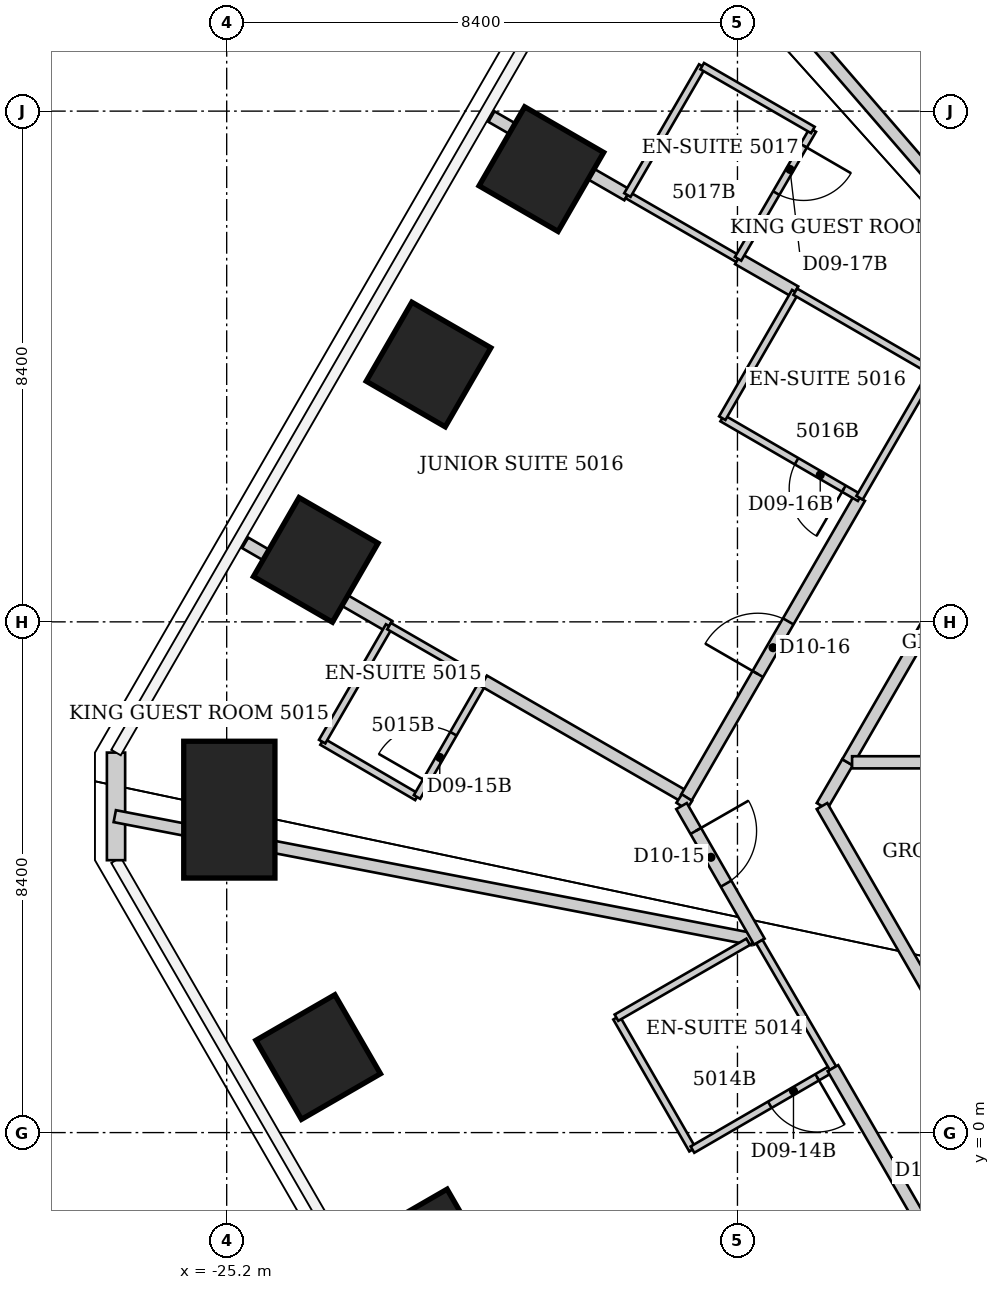
"""IFC4 building model, lengths in metres.
Left out: names, types, materials, properties, quantities, classifications, styles, units other than length and angle.
Written with IfcOpenShell. Run it as: python <this file> out.ifc"""

import sys

from ifc_helpers import new_model, si_unit, direction, frame, frame_2d, origin, origin_2d, place, context, subcontext, project, spatial, rectangle, extrude, element, fill, save


model = new_model("IFC4")
c1 = context("Model", 3, precision=1e-05, world=origin(), true_north=direction((0.0, 1.0)))
c2 = subcontext(c1, "Body", "Model", "MODEL_VIEW")
j1 = project(units=[si_unit("LENGTHUNIT", "METRE"), si_unit("PLANEANGLEUNIT", "RADIAN")], contexts=[c1])
p1 = place(None, origin())
s1 = spatial("IfcSite", under=j1, at=p1, CompositionType="ELEMENT")
p2 = place(p1, origin())
s2 = spatial("IfcBuilding", under=s1, at=p2, CompositionType="ELEMENT")
p3 = place(p2, frame((0.0, 0.0, 202.2)))
s3 = spatial("IfcBuildingStorey", under=s2, at=p3, CompositionType="ELEMENT", Elevation=202.2)
for number, where, z_axis, x_axis in (
    (1, (-21.85, -1.956, 0.0), (0.0, 0.0, 1.0), (-0.866, -0.5, 0.0)),
    (2, (-23.696, 1.242, 0.0), (0.0, 0.0, 1.0), (-0.866, -0.5, 0.0)),
):
    element("IfcColumn", number, at=place(p3, frame(where, z_axis=z_axis, x_axis=x_axis)), inside=s3, PredefinedType="COLUMN", context=c2, shape_type="SweptSolid", body=[
        extrude(rectangle(XDim=1.5, YDim=1.5, at=origin_2d()), origin(), (0.0, 0.0, 1.0), 3.8),
    ])
p4 = place(p3, frame((-25.156, 5.311, 0.0), z_axis=(0.0, 0.0, 1.0), x_axis=(-1.0, 0.0, 0.0)))
e3 = element("IfcColumn", 3, at=p4, inside=s3, PredefinedType="COLUMN", context=c2, shape_type="SweptSolid", body=[
    extrude(rectangle(XDim=1.5, YDim=2.25, at=origin_2d()), origin(), (0.0, 0.0, 1.0), 3.8),
])
for number, where, z_axis, x_axis in (
    (4, (-23.735, 9.419, 0.0), (0.0, 0.0, 1.0), (-0.866, 0.5, 0.0)),
    (5, (-21.88, 12.633, 0.0), (0.0, 0.0, 1.0), (-0.866, 0.5, 0.0)),
    (6, (-20.025, 15.846, 0.0), (0.0, 0.0, 1.0), (-0.866, 0.5, 0.0)),
):
    element("IfcColumn", number, at=place(p3, frame(where, z_axis=z_axis, x_axis=x_axis)), inside=s3, PredefinedType="COLUMN", context=c2, shape_type="SweptSolid", body=[
        extrude(rectangle(XDim=1.5, YDim=1.5, at=origin_2d()), origin(), (0.0, 0.0, 1.0), 3.8),
    ])
p5 = place(p3, frame((-27.02, 4.48, 0.0), z_axis=(0.0, 0.0, 1.0), x_axis=(0.0, 1.0, 0.0)))
e7 = element("IfcWall", 7, at=p5, inside=s3, PredefinedType="SOLIDWALL", context=c2, shape_type="SweptSolid", body=[
    extrude(rectangle(XDim=1.77, YDim=0.3, at=frame_2d((0.885, 0.0))), origin(), (0.0, 0.0, 1.0), 3.64),
])
p6 = place(p3, frame((-27.041, 5.204, 0.0), z_axis=(0.0, 0.0, 1.0), x_axis=(0.981884490433, -0.18948046719, 0.0)))
e8 = element("IfcWall", 8, at=p6, inside=s3, PredefinedType="PARTITIONING", context=c2, shape_type="SweptSolid", body=[
    extrude(rectangle(XDim=10.684, YDim=0.2, at=frame_2d((5.342, 0.0))), origin(), (0.0, 0.0, 1.0), 3.64),
])
p7 = place(p3, frame((-24.896, 9.7, 0.0), z_axis=(0.0, 0.0, 1.0), x_axis=(0.865432398871, -0.501025710902, 0.0)))
e9 = element("IfcWall", 9, at=p7, inside=s3, PredefinedType="PARTITIONING", context=c2, shape_type="SweptSolid", body=[
    extrude(rectangle(XDim=2.734, YDim=0.2, at=frame_2d((1.367, 0.0))), origin(), (0.0, 0.0, 1.0), 3.64),
])
p8 = place(p3, frame((-23.63, 6.43, 0.0), z_axis=(0.0, 0.0, 1.0), x_axis=(0.863773997337, -0.503879431535, 0.0)))
e10 = element("IfcWall", 10, at=p8, inside=s3, PredefinedType="PARTITIONING", context=c2, shape_type="SweptSolid", body=[
    extrude(rectangle(XDim=1.806, YDim=0.12, at=frame_2d((0.903, 0.0))), origin(), (0.0, 0.0, 1.0), 3.64),
])
p9 = place(p3, frame((-22.53, 8.33, 0.0), z_axis=(0.0, 0.0, 1.0), x_axis=(-0.500957366999, -0.865471961677, 0.0)))
e11 = element("IfcWall", 11, at=p9, inside=s3, PredefinedType="PARTITIONING", context=c2, shape_type="SweptSolid", body=[
    extrude(rectangle(XDim=2.196, YDim=0.12, at=frame_2d((1.098, 0.0))), origin(), (0.0, 0.0, 1.0), 3.64),
])
p10 = place(p3, frame((-22.53, 8.33, 0.0), z_axis=(0.0, 0.0, 1.0), x_axis=(0.866158505053, -0.499769390944, 0.0)))
e12 = element("IfcWall", 12, at=p10, inside=s3, PredefinedType="PARTITIONING", context=c2, shape_type="SweptSolid", body=[
    extrude(rectangle(XDim=1.801, YDim=0.12, at=frame_2d((0.9, 0.0))), origin(), (0.0, 0.0, 1.0), 3.64),
])
p11 = place(p3, frame((-22.07, 5.52, 0.0), z_axis=(0.0, 0.0, 1.0), x_axis=(0.499118212815, 0.866533905648, 0.0)))
e13 = element("IfcWall", 13, at=p11, inside=s3, PredefinedType="PARTITIONING", context=c2, shape_type="SweptSolid", body=[
    extrude(rectangle(XDim=2.204, YDim=0.12, at=frame_2d((1.102, 0.0))), origin(), (0.0, 0.0, 1.0), 3.64),
])
p12 = place(p11, frame((0.3, 0.0, 0.0)))
e14 = element("IfcOpeningElement", 14, at=p12, cuts=e13, PredefinedType="OPENING", context=c2, shape_type="SweptSolid", body=[
    extrude(rectangle(XDim=0.9, YDim=2.03, at=frame_2d((0.45, 1.015))), frame((0.0, 0.06, 0.0), z_axis=(0.0, -1.0, 0.0), x_axis=(1.0, 0.0, 0.0)), (0.0, 0.0, 1.0), 0.12),
])
p13 = place(p3, frame((-20.97, 7.43, 0.0), z_axis=(0.0, 0.0, 1.0), x_axis=(0.866325681624, -0.499479542482, 0.0)))
e15 = element("IfcWall", 15, at=p13, inside=s3, PredefinedType="PARTITIONING", context=c2, shape_type="SweptSolid", body=[
    extrude(rectangle(XDim=3.829, YDim=0.2, at=frame_2d((1.914, 0.0))), origin(), (0.0, 0.0, 1.0), 3.64),
])
p14 = place(p3, frame((-20.846, 16.71, 0.0), z_axis=(0.0, 0.0, 1.0), x_axis=(0.866163541035, -0.499760662899, 0.0)))
e16 = element("IfcWall", 16, at=p14, inside=s3, PredefinedType="PARTITIONING", context=c2, shape_type="SweptSolid", body=[
    extrude(rectangle(XDim=2.581, YDim=0.2, at=frame_2d((1.291, 0.0))), origin(), (0.0, 0.0, 1.0), 3.64),
])
p15 = place(p3, frame((-18.79, 1.89, 0.0), z_axis=(0.0, 0.0, 1.0), x_axis=(0.499159685399, -0.866510016372, 0.0)))
e17 = element("IfcWall", 17, at=p15, inside=s3, PredefinedType="PARTITIONING", context=c2, shape_type="SweptSolid", body=[
    extrude(rectangle(XDim=2.504, YDim=0.12, at=frame_2d((1.252, 0.0))), origin(), (0.0, 0.0, 1.0), 3.64),
])
p16 = place(p3, frame((-18.61, 15.42, 0.0), z_axis=(0.0, 0.0, 1.0), x_axis=(0.86618365172, -0.499725806311, 0.0)))
e18 = element("IfcWall", 18, at=p16, inside=s3, PredefinedType="PARTITIONING", context=c2, shape_type="SweptSolid", body=[
    extrude(rectangle(XDim=2.101, YDim=0.12, at=frame_2d((1.051, 0.0))), origin(), (0.0, 0.0, 1.0), 3.64),
])
p17 = place(p3, frame((-18.02, 20.817, 0.0), z_axis=(0.0, 0.0, 1.0), x_axis=(0.654118793629, -0.756391832201, 0.0)))
e19 = element("IfcWall", 19, at=p17, inside=s3, PredefinedType="PARTITIONING", context=c2, shape_type="SweptSolid", body=[
    extrude(rectangle(XDim=8.088, YDim=0.2, at=frame_2d((4.044, 0.0))), origin(), (0.0, 0.0, 1.0), 3.64),
])
p18 = place(p3, frame((-17.64, 5.51, 0.0), z_axis=(0.0, 0.0, 1.0), x_axis=(0.500468304441, 0.865754859212, 0.0)))
e20 = element("IfcWall", 20, at=p18, inside=s3, PredefinedType="PARTITIONING", context=c2, shape_type="SweptSolid", body=[
    extrude(rectangle(XDim=5.694, YDim=0.2, at=frame_2d((2.847, 0.0))), origin(), (0.0, 0.0, 1.0), 3.64),
])
p19 = place(p18, frame((2.347, 0.0, 0.0)))
e21 = element("IfcOpeningElement", 21, at=p19, cuts=e20, PredefinedType="OPENING", context=c2, shape_type="SweptSolid", body=[
    extrude(rectangle(XDim=1.0, YDim=2.13, at=frame_2d((0.5, 1.065))), frame((0.0, 0.1, 0.0), z_axis=(0.0, -1.0, 0.0), x_axis=(1.0, 0.0, 0.0)), (0.0, 0.0, 1.0), 0.2),
])
p20 = place(p3, frame((-17.63, 5.51, 0.0), z_axis=(0.0, 0.0, 1.0), x_axis=(-0.541424846284, -0.840749151547, 0.0)))
e22 = element("IfcWall", 22, at=p20, inside=s3, PredefinedType="PARTITIONING", context=c2, shape_type="SweptSolid", body=[
    extrude(rectangle(XDim=0.167, YDim=0.2, at=frame_2d((0.083, 0.0))), origin(), (0.0, 0.0, 1.0), 3.64),
])
p21 = place(p3, frame((-17.54, -0.28, 0.0), z_axis=(0.0, 0.0, 1.0), x_axis=(0.86498992408, 0.501789229896, 0.0)))
e23 = element("IfcWall", 23, at=p21, inside=s3, PredefinedType="PARTITIONING", context=c2, shape_type="SweptSolid", body=[
    extrude(rectangle(XDim=2.671, YDim=0.12, at=frame_2d((1.335, 0.0))), origin(), (0.0, 0.0, 1.0), 3.64),
])
p22 = place(p21, frame((1.47, 0.0, 0.0)))
e24 = element("IfcOpeningElement", 24, at=p22, cuts=e23, PredefinedType="OPENING", context=c2, shape_type="SweptSolid", body=[
    extrude(rectangle(XDim=0.9, YDim=2.03, at=frame_2d((0.45, 1.015))), frame((0.0, 0.06, 0.0), z_axis=(0.0, -1.0, 0.0), x_axis=(1.0, 0.0, 0.0)), (0.0, 0.0, 1.0), 0.12),
])
p23 = place(p3, frame((-17.38, 17.54, 0.0), z_axis=(0.0, 0.0, 1.0), x_axis=(-0.501888006485, -0.864932615264, 0.0)))
e25 = element("IfcWall", 25, at=p23, inside=s3, PredefinedType="PARTITIONING", context=c2, shape_type="SweptSolid", body=[
    extrude(rectangle(XDim=2.451, YDim=0.12, at=frame_2d((1.226, 0.0))), origin(), (0.0, 0.0, 1.0), 3.64),
])
p24 = place(p3, frame((-17.05, 11.75, 0.0), z_axis=(0.0, 0.0, 1.0), x_axis=(0.865155281359, -0.50150407689, 0.0)))
e26 = element("IfcWall", 26, at=p24, inside=s3, PredefinedType="PARTITIONING", context=c2, shape_type="SweptSolid", body=[
    extrude(rectangle(XDim=2.612, YDim=0.12, at=frame_2d((1.306, 0.0))), origin(), (0.0, 0.0, 1.0), 3.64),
])
p25 = place(p24, frame((1.412, 0.0, 0.0)))
e27 = element("IfcOpeningElement", 27, at=p25, cuts=e26, PredefinedType="OPENING", context=c2, shape_type="SweptSolid", body=[
    extrude(rectangle(XDim=0.9, YDim=2.03, at=frame_2d((0.45, 1.015))), frame((0.0, 0.06, 0.0), z_axis=(0.0, -1.0, 0.0), x_axis=(1.0, 0.0, 0.0)), (0.0, 0.0, 1.0), 0.12),
])
p26 = place(p3, frame((-16.79, 14.37, 0.0), z_axis=(0.0, 0.0, 1.0), x_axis=(0.867132442133, -0.498077632303, 0.0)))
e28 = element("IfcWall", 28, at=p26, inside=s3, PredefinedType="PARTITIONING", context=c2, shape_type="SweptSolid", body=[
    extrude(rectangle(XDim=1.084, YDim=0.2, at=frame_2d((0.542, 0.0))), origin(), (0.0, 0.0, 1.0), 3.64),
])
p27 = place(p3, frame((-16.79, 14.37, 0.0), z_axis=(0.0, 0.0, 1.0), x_axis=(0.501856726365, 0.86495076519, 0.0)))
e29 = element("IfcWall", 29, at=p27, inside=s3, PredefinedType="PARTITIONING", context=c2, shape_type="SweptSolid", body=[
    extrude(rectangle(XDim=2.451, YDim=0.12, at=frame_2d((1.226, 0.0))), origin(), (0.0, 0.0, 1.0), 3.64),
])
p28 = place(p27, frame((1.251, 0.0, 0.0)))
e30 = element("IfcOpeningElement", 30, at=p28, cuts=e29, PredefinedType="OPENING", context=c2, shape_type="SweptSolid", body=[
    extrude(rectangle(XDim=0.9, YDim=2.03, at=frame_2d((0.45, 1.015))), frame((0.0, 0.06, 0.0), z_axis=(0.0, -1.0, 0.0), x_axis=(1.0, 0.0, 0.0)), (0.0, 0.0, 1.0), 0.12),
])
p29 = place(p3, frame((-16.624, 3.138, 0.0), z_axis=(0.0, 0.0, 1.0), x_axis=(-0.866525185869, -0.499133351175, 0.0)))
e31 = element("IfcWall", 31, at=p29, inside=s3, PredefinedType="PARTITIONING", context=c2, shape_type="SweptSolid", body=[
    extrude(rectangle(XDim=2.5, YDim=0.12, at=frame_2d((1.25, 0.0))), origin(), (0.0, 0.0, 1.0), 3.038),
])
p30 = place(p3, frame((-16.44, 3.14, 0.0), z_axis=(0.0, 0.0, 1.0), x_axis=(-0.497825198029, 0.867277390578, 0.0)))
e32 = element("IfcWall", 32, at=p30, inside=s3, PredefinedType="PARTITIONING", context=c2, shape_type="SweptSolid", body=[
    extrude(rectangle(XDim=2.571, YDim=0.2, at=frame_2d((1.286, 0.0))), origin(), (0.0, 0.0, 1.0), 3.64),
])
p31 = place(p30, frame((1.1, 0.0, 0.0)))
e33 = element("IfcOpeningElement", 33, at=p31, cuts=e32, PredefinedType="OPENING", context=c2, shape_type="SweptSolid", body=[
    extrude(rectangle(XDim=1.0, YDim=2.13, at=frame_2d((0.5, 1.065))), frame((0.0, 0.1, 0.0), z_axis=(0.0, -1.0, 0.0), x_axis=(1.0, 0.0, 0.0)), (0.0, 0.0, 1.0), 0.2),
])
p32 = place(p3, frame((-16.44, 3.14, 0.0), z_axis=(0.0, 0.0, 1.0), x_axis=(0.502854986947, -0.864370789709, 0.0)))
e34 = element("IfcWall", 34, at=p32, inside=s3, PredefinedType="PARTITIONING", context=c2, shape_type="SweptSolid", body=[
    extrude(rectangle(XDim=2.406, YDim=0.12, at=frame_2d((1.203, 0.0))), origin(), (0.0, 0.0, 1.0), 3.64),
])
p33 = place(p3, frame((-15.85, 13.83, 0.0), z_axis=(0.0, 0.0, 1.0), x_axis=(-0.499693115345, -0.866202511239, 0.0)))
e35 = element("IfcWall", 35, at=p33, inside=s3, PredefinedType="PARTITIONING", context=c2, shape_type="SweptSolid", body=[
    extrude(rectangle(XDim=2.401, YDim=0.12, at=frame_2d((1.201, 0.0))), origin(), (0.0, 0.0, 1.0), 3.64),
])
p34 = place(p3, frame((-15.85, 13.83, 0.0), z_axis=(0.0, 0.0, 1.0), x_axis=(0.865155281359, -0.50150407689, 0.0)))
e36 = element("IfcWall", 36, at=p34, inside=s3, PredefinedType="PARTITIONING", context=c2, shape_type="SweptSolid", body=[
    extrude(rectangle(XDim=2.612, YDim=0.12, at=frame_2d((1.306, 0.0))), origin(), (0.0, 0.0, 1.0), 3.64),
])
p35 = place(p3, frame((-15.56, 16.49, 0.0), z_axis=(0.0, 0.0, 1.0), x_axis=(-0.86618365172, 0.499725806311, 0.0)))
e37 = element("IfcWall", 37, at=p35, inside=s3, PredefinedType="PARTITIONING", context=c2, shape_type="SweptSolid", body=[
    extrude(rectangle(XDim=2.101, YDim=0.12, at=frame_2d((1.051, 0.0))), origin(), (0.0, 0.0, 1.0), 3.64),
])
p36 = place(p3, frame((-15.41, 5.37, 0.0), z_axis=(0.0, 0.0, 1.0), x_axis=(0.503943891868, 0.863736391412, 0.0)))
e38 = element("IfcWall", 38, at=p36, inside=s3, PredefinedType="PARTITIONING", context=c2, shape_type="SweptSolid", body=[
    extrude(rectangle(XDim=0.833, YDim=0.2, at=frame_2d((0.417, 0.0))), origin(), (0.0, 0.0, 1.0), 3.64),
])
p37 = place(p3, frame((-15.23, 1.06, 0.0), z_axis=(0.0, 0.0, 1.0), x_axis=(0.499729921425, -0.866181277581, 0.0)))
e39 = element("IfcWall", 39, at=p37, inside=s3, PredefinedType="PARTITIONING", context=c2, shape_type="SweptSolid", body=[
    extrude(rectangle(XDim=6.604, YDim=0.2, at=frame_2d((3.302, 0.0))), origin(), (0.0, 0.0, 1.0), 3.64),
])
p38 = place(p37, frame((2.802, 0.0, 0.0)))
e40 = element("IfcOpeningElement", 40, at=p38, cuts=e39, PredefinedType="OPENING", context=c2, shape_type="SweptSolid", body=[
    extrude(rectangle(XDim=1.0, YDim=2.13, at=frame_2d((0.5, 1.065))), frame((0.0, 0.1, 0.0), z_axis=(0.0, -1.0, 0.0), x_axis=(1.0, 0.0, 0.0)), (0.0, 0.0, 1.0), 0.2),
])
p39 = place(p3, frame((-14.99, 6.09, 0.0), z_axis=(0.0, 0.0, 1.0), x_axis=(0.500213626659, 0.86590203124, 0.0)))
e41 = element("IfcWall", 41, at=p39, inside=s3, PredefinedType="PARTITIONING", context=c2, shape_type="SweptSolid", body=[
    extrude(rectangle(XDim=5.278, YDim=0.2, at=frame_2d((2.639, 0.0))), origin(), (0.0, 0.0, 1.0), 3.64),
])
p40 = place(p3, frame((-14.915, 6.09, 0.0), z_axis=(0.0, 0.0, 1.0), x_axis=(1.0, 0.0, 0.0)))
e42 = element("IfcWall", 42, at=p40, inside=s3, PredefinedType="PARTITIONING", context=c2, shape_type="SweptSolid", body=[
    extrude(rectangle(XDim=4.355, YDim=0.2, at=frame_2d((2.177, 0.0))), origin(), (0.0, 0.0, 1.0), 3.64),
])
p41 = place(p3, frame((-14.792, 10.441, 0.0), z_axis=(0.0, 0.0, 1.0), x_axis=(0.501340276177, 0.865250210912, 0.0)))
e43 = element("IfcWall", 43, at=p41, inside=s3, PredefinedType="PARTITIONING", context=c2, shape_type="SweptSolid", body=[
    extrude(rectangle(XDim=2.437, YDim=0.12, at=frame_2d((1.219, 0.0))), origin(), (0.0, 0.0, 1.0), 3.64),
])
p42 = place(p3, frame((-13.19, 1.52, 0.0), z_axis=(0.0, 0.0, 1.0), x_axis=(-0.499513190454, 0.866306281036, 0.0)))
e44 = element("IfcWall", 44, at=p42, inside=s3, PredefinedType="PARTITIONING", context=c2, shape_type="SweptSolid", body=[
    extrude(rectangle(XDim=4.444, YDim=0.2, at=frame_2d((2.222, 0.0))), origin(), (0.0, 0.0, 1.0), 3.64),
])
p43 = place(p22, origin())
e45 = element("IfcDoor", 45, at=p43, inside=s3, OperationType="SINGLE_SWING_RIGHT", PredefinedType="DOOR", context=c2, shape_type="SweptSolid", body=[
    extrude(rectangle(XDim=0.9, YDim=2.03, at=frame_2d((0.45, 1.015))), frame((0.0, 0.025, 0.0), z_axis=(0.0, -1.0, 0.0), x_axis=(1.0, 0.0, 0.0)), (0.0, 0.0, 1.0), 0.05),
])
fill(e24, e45)
p44 = place(p31, origin())
e46 = element("IfcDoor", 46, at=p44, inside=s3, OperationType="SINGLE_SWING_RIGHT", PredefinedType="DOOR", context=c2, shape_type="SweptSolid", body=[
    extrude(rectangle(XDim=1.0, YDim=2.13, at=frame_2d((0.5, 1.065))), frame((0.0, 0.025, 0.0), z_axis=(0.0, -1.0, 0.0), x_axis=(1.0, 0.0, 0.0)), (0.0, 0.0, 1.0), 0.05),
])
fill(e33, e46)
p45 = place(p12, origin())
e47 = element("IfcDoor", 47, at=p45, inside=s3, OperationType="SINGLE_SWING_LEFT", PredefinedType="DOOR", context=c2, shape_type="SweptSolid", body=[
    extrude(rectangle(XDim=0.9, YDim=2.03, at=frame_2d((0.45, 1.015))), frame((0.0, 0.025, 0.0), z_axis=(0.0, -1.0, 0.0), x_axis=(1.0, 0.0, 0.0)), (0.0, 0.0, 1.0), 0.05),
])
fill(e14, e47)
p46 = place(p19, origin())
e48 = element("IfcDoor", 48, at=p46, inside=s3, OperationType="SINGLE_SWING_LEFT", PredefinedType="DOOR", context=c2, shape_type="SweptSolid", body=[
    extrude(rectangle(XDim=1.0, YDim=2.13, at=frame_2d((0.5, 1.065))), frame((0.0, 0.025, 0.0), z_axis=(0.0, -1.0, 0.0), x_axis=(1.0, 0.0, 0.0)), (0.0, 0.0, 1.0), 0.05),
])
fill(e21, e48)
p47 = place(p25, origin())
e49 = element("IfcDoor", 49, at=p47, inside=s3, OperationType="SINGLE_SWING_RIGHT", PredefinedType="DOOR", context=c2, shape_type="SweptSolid", body=[
    extrude(rectangle(XDim=0.9, YDim=2.03, at=frame_2d((0.45, 1.015))), frame((0.0, 0.025, 0.0), z_axis=(0.0, -1.0, 0.0), x_axis=(1.0, 0.0, 0.0)), (0.0, 0.0, 1.0), 0.05),
])
fill(e27, e49)
p48 = place(p28, origin())
e50 = element("IfcDoor", 50, at=p48, inside=s3, OperationType="SINGLE_SWING_RIGHT", PredefinedType="DOOR", context=c2, shape_type="SweptSolid", body=[
    extrude(rectangle(XDim=0.9, YDim=2.03, at=frame_2d((0.45, 1.015))), frame((0.0, 0.025, 0.0), z_axis=(0.0, -1.0, 0.0), x_axis=(1.0, 0.0, 0.0)), (0.0, 0.0, 1.0), 0.05),
])
fill(e30, e50)
save(model, sys.argv[1])
